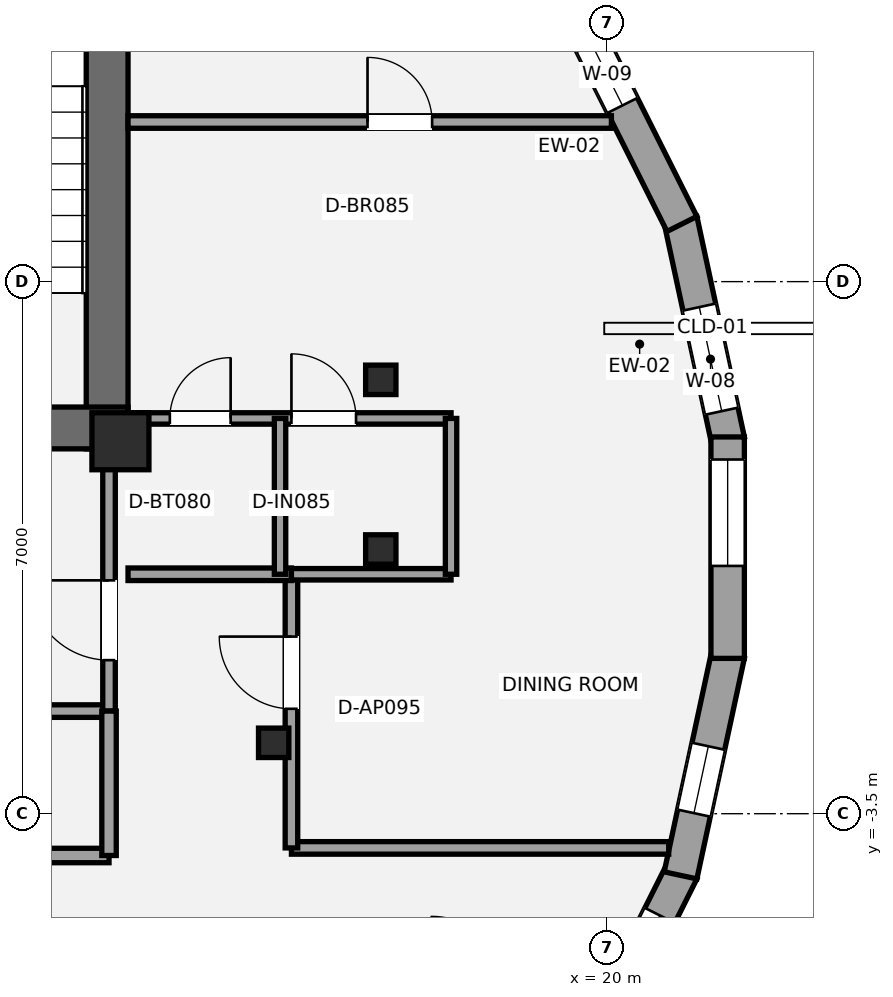
"""IFC4 building model, lengths in metres.
Left out: names, types, materials, properties, quantities, classifications, styles, units other than length and angle.
Written with IfcOpenShell. Run it as: python <this file> out.ifc"""

import sys

from ifc_helpers import new_model, si_unit, direction, frame, frame_2d, origin, origin_2d, place, context, subcontext, project, spatial, rectangle, i_section, extrude, element, fill, save


model = new_model("IFC4")
c1 = context("Model", 3, precision=1e-05, world=origin(), true_north=direction((0.0, 1.0)))
c2 = subcontext(c1, "Body", "Model", "MODEL_VIEW")
j1 = project(units=[si_unit("LENGTHUNIT", "METRE"), si_unit("PLANEANGLEUNIT", "RADIAN")], contexts=[c1])
p1 = place(None, origin())
s1 = spatial("IfcSite", under=j1, at=p1, CompositionType="ELEMENT")
p2 = place(p1, origin())
s2 = spatial("IfcBuilding", under=s1, at=p2, CompositionType="ELEMENT")
p3 = place(p2, frame((0.0, 0.0, 244.65)))
s3 = spatial("IfcBuildingStorey", under=s2, at=p3, CompositionType="ELEMENT", Elevation=244.65)
p4 = place(p3, frame((13.425, 1.3, 0.0), z_axis=(0.0, 0.0, 1.0), x_axis=(0.0, 1.0, 0.0)))
e1 = element("IfcWall", 1, at=p4, inside=s3, PredefinedType="SHEAR", context=c2, shape_type="SweptSolid", body=[
    extrude(rectangle(XDim=8.25, YDim=0.55, at=frame_2d((4.125, 0.0))), origin(), (0.0, 0.0, 1.0), 3.15),
])
p5 = place(p3, frame((13.7, 1.575, 0.0), z_axis=(0.0, 0.0, 1.0), x_axis=(-1.0, 0.0, 0.0)))
e2 = element("IfcWall", 2, at=p5, inside=s3, PredefinedType="SHEAR", context=c2, shape_type="SweptSolid", body=[
    extrude(rectangle(XDim=8.775, YDim=0.55, at=frame_2d((4.387, 0.0))), origin(), (0.0, 0.0, 1.0), 3.15),
])
p6 = place(p5, frame((2.35, 0.0, 0.0)))
e3 = element("IfcOpeningElement", 3, at=p6, cuts=e2, PredefinedType="OPENING", context=c2, shape_type="SweptSolid", body=[
    extrude(rectangle(XDim=1.05, YDim=2.15, at=frame_2d((0.525, 1.075))), frame((0.0, 0.285, 0.0), z_axis=(0.0, -1.0, 0.0), x_axis=(1.0, 0.0, 0.0)), (0.0, 0.0, 1.0), 0.57),
])
p7 = place(p5, frame((4.35, 0.0, 0.0)))
e4 = element("IfcOpeningElement", 4, at=p7, cuts=e2, PredefinedType="OPENING", context=c2, shape_type="SweptSolid", body=[
    extrude(rectangle(XDim=1.1, YDim=2.2, at=frame_2d((0.55, 1.1))), frame((0.0, 0.285, 0.0), z_axis=(0.0, -1.0, 0.0), x_axis=(1.0, 0.0, 0.0)), (0.0, 0.0, 1.0), 0.57),
])
p8 = place(p3, frame((13.6, 1.4, 0.0), z_axis=(0.0, 0.0, 1.0), x_axis=(1.0, 0.0, 0.0)))
e5 = element("IfcColumn", 5, at=p8, inside=s3, PredefinedType="PILASTER", context=c2, shape_type="SweptSolid", body=[
    extrude(rectangle(XDim=0.75, YDim=0.75, at=origin_2d()), origin(), (0.0, 0.0, 1.0), 3.15),
])
for number, where, z_axis, x_axis in (
    (6, (17.026, 2.208, 0.0), (0.0, 0.0, 1.0), (1.0, 0.0, 0.0)),
    (7, (15.616, -2.567, 0.0), (0.0, 0.0, 1.0), (1.0, 0.0, 0.0)),
    (8, (17.026, -0.024, 0.0), (0.0, 0.0, 1.0), (1.0, 0.0, 0.0)),
):
    element("IfcColumn", number, at=place(p3, frame(where, z_axis=z_axis, x_axis=x_axis)), inside=s3, PredefinedType="COLUMN", context=c2, shape_type="SweptSolid", body=[
        extrude(i_section(OverallWidth=0.399, OverallDepth=0.387, WebThickness=0.021, FlangeThickness=0.033, at=origin_2d()), origin(), (0.0, 0.0, 1.0), 3.15),
    ])
p9 = place(p3, frame((20.969, 4.311, 0.0), z_axis=(0.0, 0.0, 1.0), x_axis=(0.210540350534, -0.977585168053, 0.0)))
e9 = element("IfcWall", 9, at=p9, inside=s3, PredefinedType="STANDARD", context=c2, shape_type="SweptSolid", body=[
    extrude(rectangle(XDim=2.967, YDim=0.44, at=frame_2d((1.484, 0.0))), origin(), (0.0, 0.0, 1.0), 2.336),
])
p10 = place(p9, frame((1.173, 0.0, 0.55)))
e10 = element("IfcOpeningElement", 10, at=p10, cuts=e9, PredefinedType="OPENING", context=c2, shape_type="SweptSolid", body=[
    extrude(rectangle(XDim=1.4, YDim=1.55, at=frame_2d((0.7, 0.775))), frame((0.0, 0.23, 0.0), z_axis=(0.0, -1.0, 0.0), x_axis=(1.0, 0.0, 0.0)), (0.0, 0.0, 1.0), 0.46),
])
p11 = place(p3, frame((19.578, 7.069, 0.0), z_axis=(0.0, 0.0, 1.0), x_axis=(0.448424724145, -0.893820601002, 0.0)))
e11 = element("IfcWall", 11, at=p11, inside=s3, PredefinedType="STANDARD", context=c2, shape_type="SweptSolid", body=[
    extrude(rectangle(XDim=3.144, YDim=0.44, at=frame_2d((1.572, 0.0))), origin(), (0.0, 0.0, 1.0), 2.336),
])
p12 = place(p11, frame((0.499, 0.0, 0.58)))
e12 = element("IfcOpeningElement", 12, at=p12, cuts=e11, PredefinedType="OPENING", context=c2, shape_type="SweptSolid", body=[
    extrude(rectangle(XDim=0.9, YDim=1.35, at=frame_2d((0.45, 0.675))), frame((0.0, 0.23, 0.0), z_axis=(0.0, -1.0, 0.0), x_axis=(1.0, 0.0, 0.0)), (0.0, 0.0, 1.0), 0.46),
])
p13 = place(p3, frame((20.988, -4.259, 0.0), z_axis=(0.0, 0.0, 1.0), x_axis=(-0.448424724145, -0.893820601002, 0.0)))
e13 = element("IfcWall", 13, at=p13, inside=s3, PredefinedType="STANDARD", context=c2, shape_type="SweptSolid", body=[
    extrude(rectangle(XDim=3.144, YDim=0.44, at=frame_2d((1.572, 0.0))), origin(), (0.0, 0.0, 1.0), 2.336),
])
p14 = place(p13, frame((0.648, 0.0, 0.58)))
e14 = element("IfcOpeningElement", 14, at=p14, cuts=e13, PredefinedType="OPENING", context=c2, shape_type="SweptSolid", body=[
    extrude(rectangle(XDim=0.9, YDim=1.35, at=frame_2d((0.45, 0.675))), frame((0.0, 0.23, 0.0), z_axis=(0.0, -1.0, 0.0), x_axis=(1.0, 0.0, 0.0)), (0.0, 0.0, 1.0), 0.46),
])
p15 = place(p3, frame((21.594, -1.41, 0.0), z_axis=(0.0, 0.0, 1.0), x_axis=(-0.210540350534, -0.977585168053, 0.0)))
e15 = element("IfcWall", 15, at=p15, inside=s3, PredefinedType="STANDARD", context=c2, shape_type="SweptSolid", body=[
    extrude(rectangle(XDim=2.967, YDim=0.44, at=frame_2d((1.484, 0.0))), origin(), (0.0, 0.0, 1.0), 2.336),
])
p16 = place(p15, frame((1.23, 0.0, 0.58)))
e16 = element("IfcOpeningElement", 16, at=p16, cuts=e15, PredefinedType="OPENING", context=c2, shape_type="SweptSolid", body=[
    extrude(rectangle(XDim=0.9, YDim=1.35, at=frame_2d((0.45, 0.675))), frame((0.0, 0.23, 0.0), z_axis=(0.0, -1.0, 0.0), x_axis=(1.0, 0.0, 0.0)), (0.0, 0.0, 1.0), 0.46),
])
p17 = place(p3, frame((21.589, 1.457, 0.0), z_axis=(0.0, 0.0, 1.0), x_axis=(0.0, -1.0, 0.0)))
e17 = element("IfcWall", 17, at=p17, inside=s3, PredefinedType="STANDARD", context=c2, shape_type="SweptSolid", body=[
    extrude(rectangle(XDim=2.913, YDim=0.44, at=frame_2d((1.457, 0.0))), origin(), (0.0, 0.0, 1.0), 2.34),
])
p18 = place(p17, frame((0.297, 0.0, 0.58)))
e18 = element("IfcOpeningElement", 18, at=p18, cuts=e17, PredefinedType="OPENING", context=c2, shape_type="SweptSolid", body=[
    extrude(rectangle(XDim=1.4, YDim=1.55, at=frame_2d((0.7, 0.775))), frame((0.0, 0.23, 0.0), z_axis=(0.0, -1.0, 0.0), x_axis=(1.0, 0.0, 0.0)), (0.0, 0.0, 1.0), 0.46),
])
p19 = place(p3, frame((7.2, -2.15, 0.0), z_axis=(0.0, 0.0, 1.0), x_axis=(1.0, 0.0, 0.0)))
e19 = element("IfcWall", 19, at=p19, inside=s3, PredefinedType="PARTITIONING", context=c2, shape_type="SweptSolid", body=[
    extrude(rectangle(XDim=6.25, YDim=0.165, at=frame_2d((3.125, 0.0))), origin(), (0.0, 0.0, 1.0), 2.97),
])
p20 = place(p3, frame((13.45, -2.15, 0.0), z_axis=(0.0, 0.0, 1.0), x_axis=(0.0, 1.0, 0.0)))
e20 = element("IfcWall", 20, at=p20, inside=s3, PredefinedType="PARTITIONING", context=c2, shape_type="SweptSolid", body=[
    extrude(rectangle(XDim=3.5, YDim=0.165, at=frame_2d((1.75, 0.0))), origin(), (0.0, 0.0, 1.0), 2.423),
])
p21 = place(p20, frame((0.67, 0.0, 0.0)))
e21 = element("IfcOpeningElement", 21, at=p21, cuts=e20, PredefinedType="OPENING", context=c2, shape_type="SweptSolid", body=[
    extrude(rectangle(XDim=1.05, YDim=2.15, at=frame_2d((0.525, 1.075))), frame((0.0, 0.093, 0.0), z_axis=(0.0, -1.0, 0.0), x_axis=(1.0, 0.0, 0.0)), (0.0, 0.0, 1.0), 0.185),
])
p22 = place(p3, frame((2.1, -4.05, 0.0), z_axis=(0.0, 0.0, 1.0), x_axis=(1.0, 0.0, 0.0)))
e22 = element("IfcWall", 22, at=p22, inside=s3, PredefinedType="PLUMBINGWALL", context=c2, shape_type="SweptSolid", body=[
    extrude(rectangle(XDim=11.35, YDim=0.19, at=frame_2d((5.675, 0.0))), origin(), (0.0, 0.0, 1.0), 2.357),
])
p23 = place(p22, frame((1.4, 0.0, 0.0)))
e23 = element("IfcOpeningElement", 23, at=p23, cuts=e22, PredefinedType="OPENING", context=c2, shape_type="SweptSolid", body=[
    extrude(rectangle(XDim=0.9, YDim=2.1, at=frame_2d((0.45, 1.05))), frame((0.0, 0.105, 0.0), z_axis=(0.0, -1.0, 0.0), x_axis=(1.0, 0.0, 0.0)), (0.0, 0.0, 1.0), 0.21),
])
p24 = place(p22, frame((5.3, 0.0, 0.0)))
e24 = element("IfcOpeningElement", 24, at=p24, cuts=e22, PredefinedType="OPENING", context=c2, shape_type="SweptSolid", body=[
    extrude(rectangle(XDim=0.9, YDim=2.1, at=frame_2d((0.45, 1.05))), frame((0.0, 0.105, 0.0), z_axis=(0.0, -1.0, 0.0), x_axis=(1.0, 0.0, 0.0)), (0.0, 0.0, 1.0), 0.21),
])
p25 = place(p22, frame((9.1, 0.0, 0.0)))
e25 = element("IfcOpeningElement", 25, at=p25, cuts=e22, PredefinedType="OPENING", context=c2, shape_type="SweptSolid", body=[
    extrude(rectangle(XDim=0.9, YDim=2.1, at=frame_2d((0.45, 1.05))), frame((0.0, 0.105, 0.0), z_axis=(0.0, -1.0, 0.0), x_axis=(1.0, 0.0, 0.0)), (0.0, 0.0, 1.0), 0.21),
])
p26 = place(p3, frame((13.45, -4.05, 0.0), z_axis=(0.0, 0.0, 1.0), x_axis=(0.0, 1.0, 0.0)))
e26 = element("IfcWall", 26, at=p26, inside=s3, PredefinedType="PLUMBINGWALL", context=c2, shape_type="SweptSolid", body=[
    extrude(rectangle(XDim=1.9, YDim=0.19, at=frame_2d((0.95, 0.0))), origin(), (0.0, 0.0, 1.0), 2.423),
])
p27 = place(p3, frame((15.85, -3.95, 0.0), z_axis=(0.0, 0.0, 1.0), x_axis=(1.0, 0.0, 0.0)))
e27 = element("IfcWall", 27, at=p27, inside=s3, PredefinedType="PARTITIONING", context=c2, shape_type="SweptSolid", body=[
    extrude(rectangle(XDim=4.964, YDim=0.165, at=frame_2d((2.482, 0.0))), origin(), (0.0, 0.0, 1.0), 2.423),
])
p28 = place(p3, frame((15.85, -3.95, 0.0), z_axis=(0.0, 0.0, 1.0), x_axis=(0.0, 1.0, 0.0)))
e28 = element("IfcWall", 28, at=p28, inside=s3, PredefinedType="PARTITIONING", context=c2, shape_type="SweptSolid", body=[
    extrude(rectangle(XDim=3.6, YDim=0.165, at=frame_2d((1.8, 0.0))), origin(), (0.0, 0.0, 1.0), 2.357),
])
p29 = place(p28, frame((1.83, 0.0, 0.0)))
e29 = element("IfcOpeningElement", 29, at=p29, cuts=e28, PredefinedType="OPENING", context=c2, shape_type="SweptSolid", body=[
    extrude(rectangle(XDim=0.95, YDim=2.15, at=frame_2d((0.475, 1.075))), frame((0.0, 0.093, 0.0), z_axis=(0.0, -1.0, 0.0), x_axis=(1.0, 0.0, 0.0)), (0.0, 0.0, 1.0), 0.185),
])
p30 = place(p3, frame((13.7, -0.35, 0.0), z_axis=(0.0, 0.0, 1.0), x_axis=(1.0, 0.0, 0.0)))
e30 = element("IfcWall", 30, at=p30, inside=s3, PredefinedType="PARTITIONING", context=c2, shape_type="SweptSolid", body=[
    extrude(rectangle(XDim=2.15, YDim=0.165, at=frame_2d((1.075, 0.0))), origin(), (0.0, 0.0, 1.0), 2.423),
])
p31 = place(p3, frame((13.7, 5.6, 0.0), z_axis=(0.0, 0.0, 1.0), x_axis=(1.0, 0.0, 0.0)))
e31 = element("IfcWall", 31, at=p31, inside=s3, PredefinedType="PARTITIONING", context=c2, shape_type="SweptSolid", body=[
    extrude(rectangle(XDim=6.36, YDim=0.165, at=frame_2d((3.18, 0.0))), origin(), (0.0, 0.0, 1.0), 2.423),
])
p32 = place(p31, frame((3.151, 0.0, 0.0)))
e32 = element("IfcOpeningElement", 32, at=p32, cuts=e31, PredefinedType="OPENING", context=c2, shape_type="SweptSolid", body=[
    extrude(rectangle(XDim=0.85, YDim=2.1, at=frame_2d((0.425, 1.05))), frame((0.0, 0.093, 0.0), z_axis=(0.0, -1.0, 0.0), x_axis=(1.0, 0.0, 0.0)), (0.0, 0.0, 1.0), 0.185),
])
p33 = place(p3, frame((13.7, 1.7, 0.0), z_axis=(0.0, 0.0, 1.0), x_axis=(1.0, 0.0, 0.0)))
e33 = element("IfcWall", 33, at=p33, inside=s3, PredefinedType="PLUMBINGWALL", context=c2, shape_type="SweptSolid", body=[
    extrude(rectangle(XDim=4.25, YDim=0.15, at=frame_2d((2.125, 0.0))), origin(), (0.0, 0.0, 1.0), 2.423),
])
p34 = place(p33, frame((0.55, 0.0, 0.0)))
e34 = element("IfcOpeningElement", 34, at=p34, cuts=e33, PredefinedType="OPENING", context=c2, shape_type="SweptSolid", body=[
    extrude(rectangle(XDim=0.8, YDim=2.1, at=frame_2d((0.4, 1.05))), frame((0.0, 0.085, 0.0), z_axis=(0.0, -1.0, 0.0), x_axis=(1.0, 0.0, 0.0)), (0.0, 0.0, 1.0), 0.17),
])
p35 = place(p33, frame((2.15, 0.0, 0.0)))
e35 = element("IfcOpeningElement", 35, at=p35, cuts=e33, PredefinedType="OPENING", context=c2, shape_type="SweptSolid", body=[
    extrude(rectangle(XDim=0.85, YDim=2.1, at=frame_2d((0.425, 1.05))), frame((0.0, 0.085, 0.0), z_axis=(0.0, -1.0, 0.0), x_axis=(1.0, 0.0, 0.0)), (0.0, 0.0, 1.0), 0.17),
])
p36 = place(p3, frame((15.85, -0.35, 0.0), z_axis=(0.0, 0.0, 1.0), x_axis=(1.0, 0.0, 0.0)))
e36 = element("IfcWall", 36, at=p36, inside=s3, PredefinedType="PLUMBINGWALL", context=c2, shape_type="SweptSolid", body=[
    extrude(rectangle(XDim=2.1, YDim=0.15, at=frame_2d((1.05, 0.0))), origin(), (0.0, 0.0, 1.0), 2.423),
])
for number, where, z_axis, x_axis in (
    (37, (15.7, -0.35, 0.0), (0.0, 0.0, 1.0), (0.0, 1.0, 0.0)),
    (38, (17.95, -0.35, 0.0), (0.0, 0.0, 1.0), (0.0, 1.0, 0.0)),
):
    element("IfcWall", number, at=place(p3, frame(where, z_axis=z_axis, x_axis=x_axis)), inside=s3, PredefinedType="PLUMBINGWALL", context=c2, shape_type="SweptSolid", body=[
        extrude(rectangle(XDim=2.05, YDim=0.15, at=frame_2d((1.025, 0.0))), origin(), (0.0, 0.0, 1.0), 2.97),
    ])
p37 = place(p10, origin())
e39 = element("IfcWindow", 39, at=p37, inside=s3, PartitioningType="SINGLE_PANEL", PredefinedType="WINDOW", context=c2, shape_type="SweptSolid", body=[
    extrude(rectangle(XDim=1.4, YDim=1.55, at=frame_2d((0.7, 0.775))), frame((0.0, -0.01, 0.0), z_axis=(0.0, -1.0, 0.0), x_axis=(1.0, 0.0, 0.0)), (0.0, 0.0, 1.0), 0.06),
])
fill(e10, e39)
p38 = place(p12, origin())
e40 = element("IfcWindow", 40, at=p38, inside=s3, PartitioningType="SINGLE_PANEL", PredefinedType="WINDOW", context=c2, shape_type="SweptSolid", body=[
    extrude(rectangle(XDim=0.9, YDim=1.35, at=frame_2d((0.45, 0.675))), frame((0.0, -0.01, 0.0), z_axis=(0.0, -1.0, 0.0), x_axis=(1.0, 0.0, 0.0)), (0.0, 0.0, 1.0), 0.06),
])
fill(e12, e40)
p39 = place(p14, origin())
e41 = element("IfcWindow", 41, at=p39, inside=s3, PartitioningType="SINGLE_PANEL", PredefinedType="WINDOW", context=c2, shape_type="SweptSolid", body=[
    extrude(rectangle(XDim=0.9, YDim=1.35, at=frame_2d((0.45, 0.675))), frame((0.0, -0.01, 0.0), z_axis=(0.0, -1.0, 0.0), x_axis=(1.0, 0.0, 0.0)), (0.0, 0.0, 1.0), 0.06),
])
fill(e14, e41)
p40 = place(p16, origin())
e42 = element("IfcWindow", 42, at=p40, inside=s3, PartitioningType="SINGLE_PANEL", PredefinedType="WINDOW", context=c2, shape_type="SweptSolid", body=[
    extrude(rectangle(XDim=0.9, YDim=1.35, at=frame_2d((0.45, 0.675))), frame((0.0, -0.01, 0.0), z_axis=(0.0, -1.0, 0.0), x_axis=(1.0, 0.0, 0.0)), (0.0, 0.0, 1.0), 0.06),
])
fill(e16, e42)
p41 = place(p18, origin())
e43 = element("IfcWindow", 43, at=p41, inside=s3, PartitioningType="SINGLE_PANEL", PredefinedType="WINDOW", context=c2, shape_type="SweptSolid", body=[
    extrude(rectangle(XDim=1.4, YDim=1.55, at=frame_2d((0.7, 0.775))), frame((0.0, -0.01, 0.0), z_axis=(0.0, -1.0, 0.0), x_axis=(1.0, 0.0, 0.0)), (0.0, 0.0, 1.0), 0.06),
])
fill(e18, e43)
p42 = place(p21, origin())
e44 = element("IfcDoor", 44, at=p42, inside=s3, OperationType="SINGLE_SWING_RIGHT", PredefinedType="DOOR", context=c2, shape_type="SweptSolid", body=[
    extrude(rectangle(XDim=1.05, YDim=2.15, at=frame_2d((0.525, 1.075))), frame((0.0, 0.025, 0.0), z_axis=(0.0, -1.0, 0.0), x_axis=(1.0, 0.0, 0.0)), (0.0, 0.0, 1.0), 0.05),
])
fill(e21, e44)
p43 = place(p29, origin())
e45 = element("IfcDoor", 45, at=p43, inside=s3, OperationType="SINGLE_SWING_RIGHT", PredefinedType="DOOR", context=c2, shape_type="SweptSolid", body=[
    extrude(rectangle(XDim=0.95, YDim=2.15, at=frame_2d((0.475, 1.075))), frame((0.0, 0.025, 0.0), z_axis=(0.0, -1.0, 0.0), x_axis=(1.0, 0.0, 0.0)), (0.0, 0.0, 1.0), 0.05),
])
fill(e29, e45)
p44 = place(p34, origin())
e46 = element("IfcDoor", 46, at=p44, inside=s3, OperationType="SINGLE_SWING_RIGHT", PredefinedType="DOOR", context=c2, shape_type="SweptSolid", body=[
    extrude(rectangle(XDim=0.8, YDim=2.1, at=frame_2d((0.4, 1.05))), frame((0.0, 0.025, 0.0), z_axis=(0.0, -1.0, 0.0), x_axis=(1.0, 0.0, 0.0)), (0.0, 0.0, 1.0), 0.05),
])
fill(e34, e46)
p45 = place(p35, origin())
e47 = element("IfcDoor", 47, at=p45, inside=s3, OperationType="SINGLE_SWING_LEFT", PredefinedType="DOOR", context=c2, shape_type="SweptSolid", body=[
    extrude(rectangle(XDim=0.85, YDim=2.1, at=frame_2d((0.425, 1.05))), frame((0.0, 0.025, 0.0), z_axis=(0.0, -1.0, 0.0), x_axis=(1.0, 0.0, 0.0)), (0.0, 0.0, 1.0), 0.05),
])
fill(e35, e47)
p46 = place(p32, origin())
e48 = element("IfcDoor", 48, at=p46, inside=s3, OperationType="SINGLE_SWING_LEFT", PredefinedType="DOOR", context=c2, shape_type="SweptSolid", body=[
    extrude(rectangle(XDim=0.85, YDim=2.1, at=frame_2d((0.425, 1.05))), frame((0.0, 0.025, 0.0), z_axis=(0.0, -1.0, 0.0), x_axis=(1.0, 0.0, 0.0)), (0.0, 0.0, 1.0), 0.05),
])
fill(e32, e48)
save(model, sys.argv[1])
